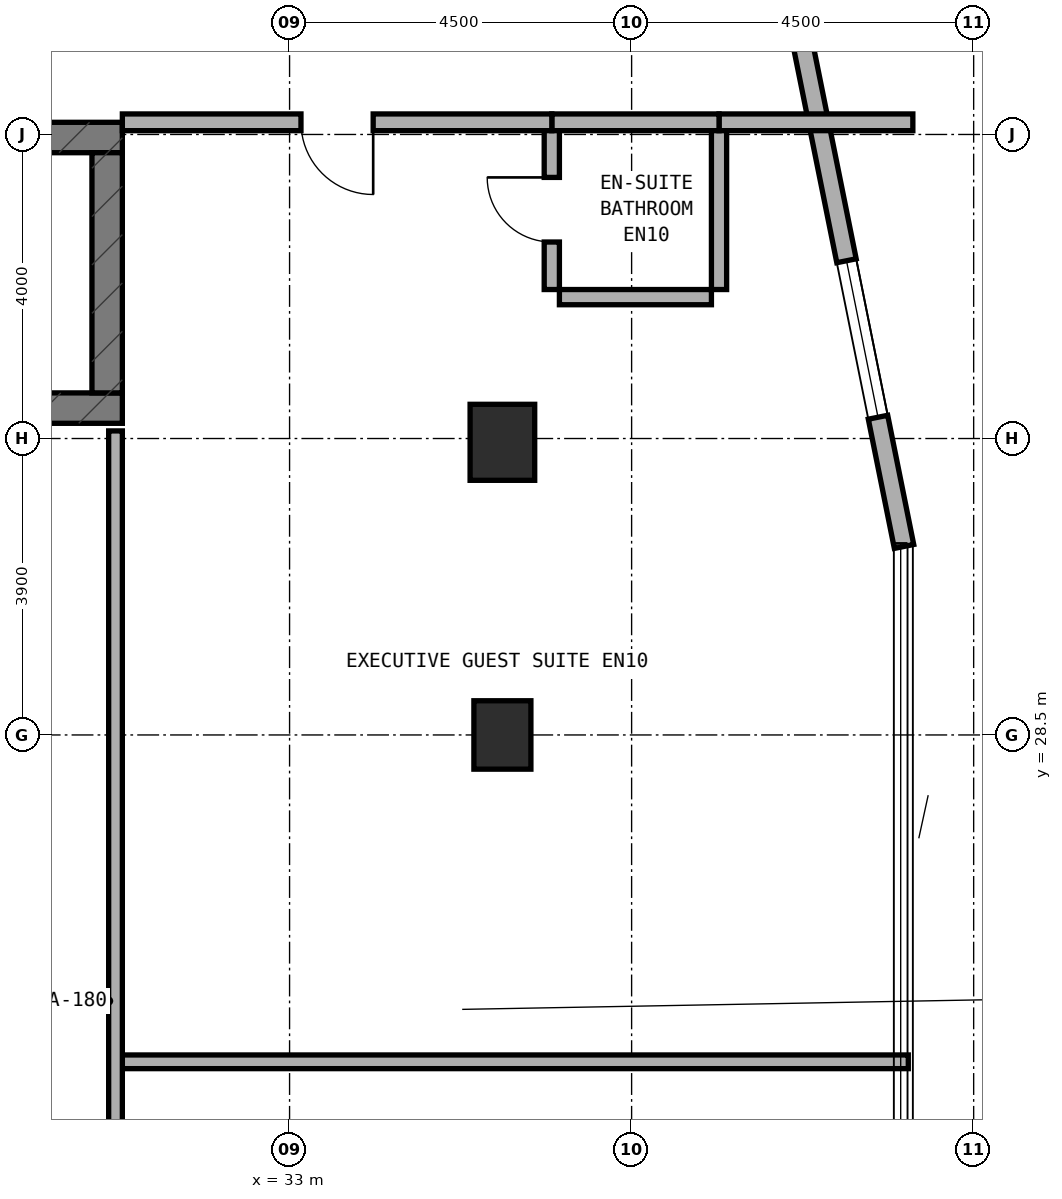
"""IFC4 building model, lengths in metres.
Left out: names, types, materials, properties, quantities, classifications, styles, units other than length and angle.
Written with IfcOpenShell. Run it as: python <this file> out.ifc"""

import sys

from ifc_helpers import new_model, si_unit, direction, frame, frame_2d, origin, origin_2d, place, context, subcontext, project, spatial, rectangle, extrude, element, fill, save


model = new_model("IFC4")
c1 = context("Model", 3, precision=1e-05, world=origin(), true_north=direction((0.0, 1.0)))
c2 = subcontext(c1, "Body", "Model", "MODEL_VIEW")
j1 = project(units=[si_unit("LENGTHUNIT", "METRE"), si_unit("PLANEANGLEUNIT", "RADIAN")], contexts=[c1])
p1 = place(None, origin())
s1 = spatial("IfcSite", under=j1, at=p1, CompositionType="ELEMENT")
p2 = place(p1, origin())
s2 = spatial("IfcBuilding", under=s1, at=p2, CompositionType="ELEMENT")
p3 = place(p2, frame((0.0, 0.0, 159.0)))
s3 = spatial("IfcBuildingStorey", under=s2, at=p3, CompositionType="ELEMENT", Elevation=159.0)
p4 = place(p3, frame((6.4, 32.8, 0.0), z_axis=(0.0, 0.0, 1.0), x_axis=(1.0, 0.0, 0.0)))
e1 = element("IfcWall", 1, at=p4, inside=s3, PredefinedType="SHEAR", context=c2, shape_type="SweptSolid", body=[
    extrude(rectangle(XDim=24.4, YDim=0.4, at=frame_2d((12.2, 0.0))), origin(), (0.0, 0.0, 1.0), 3.5),
])
p5 = place(p4, frame((6.05, 0.0, 0.0)))
e2 = element("IfcOpeningElement", 2, at=p5, cuts=e1, PredefinedType="OPENING", context=c2, shape_type="SweptSolid", body=[
    extrude(rectangle(XDim=1.1, YDim=2.15, at=frame_2d((0.55, 1.075))), frame((0.0, 0.21, 0.0), z_axis=(0.0, -1.0, 0.0), x_axis=(1.0, 0.0, 0.0)), (0.0, 0.0, 1.0), 0.42),
])
p6 = place(p3, frame((6.4, 36.36, 0.0), z_axis=(0.0, 0.0, 1.0), x_axis=(1.0, 0.0, 0.0)))
e3 = element("IfcWall", 3, at=p6, inside=s3, PredefinedType="SHEAR", context=c2, shape_type="SweptSolid", body=[
    extrude(rectangle(XDim=24.4, YDim=0.4, at=frame_2d((12.2, 0.0))), origin(), (0.0, 0.0, 1.0), 3.5),
])
p7 = place(p6, frame((9.15, 0.0, 0.0)))
e4 = element("IfcOpeningElement", 4, at=p7, cuts=e3, PredefinedType="OPENING", context=c2, shape_type="SweptSolid", body=[
    extrude(rectangle(XDim=1.2, YDim=2.15, at=frame_2d((0.6, 1.075))), frame((0.0, 0.21, 0.0), z_axis=(0.0, -1.0, 0.0), x_axis=(1.0, 0.0, 0.0)), (0.0, 0.0, 1.0), 0.42),
])
p8 = place(p6, frame((19.2, 0.0, 0.0)))
e5 = element("IfcOpeningElement", 5, at=p8, cuts=e3, PredefinedType="OPENING", context=c2, shape_type="SweptSolid", body=[
    extrude(rectangle(XDim=0.85, YDim=2.1, at=frame_2d((0.425, 1.05))), frame((0.0, 0.21, 0.0), z_axis=(0.0, -1.0, 0.0), x_axis=(1.0, 0.0, 0.0)), (0.0, 0.0, 1.0), 0.42),
])
p9 = place(p6, frame((16.94, 0.0, 0.0)))
e6 = element("IfcOpeningElement", 6, at=p9, cuts=e3, PredefinedType="OPENING", context=c2, shape_type="SweptSolid", body=[
    extrude(rectangle(XDim=0.85, YDim=2.1, at=frame_2d((0.425, 1.05))), frame((0.0, 0.21, 0.0), z_axis=(0.0, -1.0, 0.0), x_axis=(1.0, 0.0, 0.0)), (0.0, 0.0, 1.0), 0.42),
])
p10 = place(p3, frame((30.6, 33.0, 0.0), z_axis=(0.0, 0.0, 1.0), x_axis=(0.0, 1.0, 0.0)))
e7 = element("IfcWall", 7, at=p10, inside=s3, PredefinedType="SHEAR", context=c2, shape_type="SweptSolid", body=[
    extrude(rectangle(XDim=3.16, YDim=0.4, at=frame_2d((1.58, 0.0))), origin(), (0.0, 0.0, 1.0), 3.5),
])
p11 = place(p3, frame((35.8, 28.5, 0.0), z_axis=(0.0, 0.0, 1.0), x_axis=(1.0, 0.0, 0.0)))
e8 = element("IfcColumn", 8, at=p11, inside=s3, PredefinedType="COLUMN", context=c2, shape_type="SweptSolid", body=[
    extrude(rectangle(XDim=0.75, YDim=0.9, at=origin_2d()), origin(), (0.0, 0.0, 1.0), 3.5),
])
p12 = place(p3, frame((35.8, 32.35, 0.0), z_axis=(0.0, 0.0, 1.0), x_axis=(1.0, 0.0, 0.0)))
e9 = element("IfcColumn", 9, at=p12, inside=s3, PredefinedType="COLUMN", context=c2, shape_type="SweptSolid", body=[
    extrude(rectangle(XDim=0.85, YDim=1.0, at=origin_2d()), origin(), (0.0, 0.0, 1.0), 3.5),
])
p13 = place(p3, frame((41.084, 30.98, 0.0), z_axis=(0.0, 0.0, 1.0), x_axis=(-0.197435082048, 0.980315963543, 0.0)))
e10 = element("IfcWall", 10, at=p13, inside=s3, PredefinedType="STANDARD", context=c2, shape_type="SweptSolid", body=[
    extrude(rectangle(XDim=9.183, YDim=0.26, at=frame_2d((4.591, 0.0))), origin(), (0.0, 0.0, 1.0), 3.22),
])
p14 = place(p13, frame((1.734, 0.0, 0.85)))
e11 = element("IfcOpeningElement", 11, at=p14, cuts=e10, PredefinedType="OPENING", context=c2, shape_type="SweptSolid", body=[
    extrude(rectangle(XDim=2.1, YDim=1.5, at=frame_2d((1.05, 0.75))), frame((0.0, 0.14, 0.0), z_axis=(0.0, -1.0, 0.0), x_axis=(1.0, 0.0, 0.0)), (0.0, 0.0, 1.0), 0.28),
])
p15 = place(p3, frame((30.8, 24.2, 0.0), z_axis=(0.0, 0.0, 1.0), x_axis=(1.0, 0.0, 0.0)))
e12 = element("IfcWall", 12, at=p15, inside=s3, PredefinedType="SOLIDWALL", context=c2, shape_type="SweptSolid", body=[
    extrude(rectangle(XDim=10.34, YDim=0.18, at=frame_2d((5.17, 0.0))), origin(), (0.0, 0.0, 1.0), 2.835),
])
p16 = place(p3, frame((30.71, 17.5, 0.0), z_axis=(0.0, 0.0, 1.0), x_axis=(0.0, 1.0, 0.0)))
e13 = element("IfcWall", 13, at=p16, inside=s3, PredefinedType="SOLIDWALL", context=c2, shape_type="SweptSolid", body=[
    extrude(rectangle(XDim=15.0, YDim=0.18, at=frame_2d((7.5, 0.0))), origin(), (0.0, 0.0, 1.0), 2.795),
])
p17 = place(p3, frame((36.45, 34.36, 0.0), z_axis=(0.0, 0.0, 1.0), x_axis=(0.0, 1.0, 0.0)))
e14 = element("IfcWall", 14, at=p17, inside=s3, PredefinedType="PLUMBINGWALL", context=c2, shape_type="SweptSolid", body=[
    extrude(rectangle(XDim=2.1, YDim=0.2, at=frame_2d((1.05, 0.0))), origin(), (0.0, 0.0, 1.0), 3.22),
])
p18 = place(p17, frame((0.625, 0.0, 0.0)))
e15 = element("IfcOpeningElement", 15, at=p18, cuts=e14, PredefinedType="OPENING", context=c2, shape_type="SweptSolid", body=[
    extrude(rectangle(XDim=0.85, YDim=2.1, at=frame_2d((0.425, 1.05))), frame((0.0, 0.11, 0.0), z_axis=(0.0, -1.0, 0.0), x_axis=(1.0, 0.0, 0.0)), (0.0, 0.0, 1.0), 0.22),
])
p19 = place(p3, frame((36.55, 34.26, 0.0), z_axis=(0.0, 0.0, 1.0), x_axis=(1.0, 0.0, 0.0)))
e16 = element("IfcWall", 16, at=p19, inside=s3, PredefinedType="PLUMBINGWALL", context=c2, shape_type="SweptSolid", body=[
    extrude(rectangle(XDim=2.0, YDim=0.2, at=frame_2d((1.0, 0.0))), origin(), (0.0, 0.0, 1.0), 3.22),
])
p20 = place(p3, frame((38.65, 34.36, 0.0), z_axis=(0.0, 0.0, 1.0), x_axis=(0.0, 1.0, 0.0)))
e17 = element("IfcWall", 17, at=p20, inside=s3, PredefinedType="PLUMBINGWALL", context=c2, shape_type="SweptSolid", body=[
    extrude(rectangle(XDim=2.1, YDim=0.2, at=frame_2d((1.05, 0.0))), origin(), (0.0, 0.0, 1.0), 3.22),
])
p21 = place(p3, frame((38.65, 36.56, 0.0), z_axis=(0.0, 0.0, 1.0), x_axis=(1.0, 0.0, 0.0)))
e18 = element("IfcWall", 18, at=p21, inside=s3, PredefinedType="SOLIDWALL", context=c2, shape_type="SweptSolid", body=[
    extrude(rectangle(XDim=2.55, YDim=0.22, at=frame_2d((1.275, 0.0))), origin(), (0.0, 0.0, 1.0), 3.22),
])
p22 = place(p3, frame((36.45, 36.56, 0.0), z_axis=(0.0, 0.0, 1.0), x_axis=(1.0, 0.0, 0.0)))
e19 = element("IfcWall", 19, at=p22, inside=s3, PredefinedType="SOLIDWALL", context=c2, shape_type="SweptSolid", body=[
    extrude(rectangle(XDim=2.2, YDim=0.22, at=frame_2d((1.1, 0.0))), origin(), (0.0, 0.0, 1.0), 3.22),
])
p23 = place(p3, frame((30.8, 36.56, 0.0), z_axis=(0.0, 0.0, 1.0), x_axis=(1.0, 0.0, 0.0)))
e20 = element("IfcWall", 20, at=p23, inside=s3, PredefinedType="SOLIDWALL", context=c2, shape_type="SweptSolid", body=[
    extrude(rectangle(XDim=5.65, YDim=0.22, at=frame_2d((2.825, 0.0))), origin(), (0.0, 0.0, 1.0), 2.795),
])
p24 = place(p23, frame((2.35, 0.0, 0.0)))
e21 = element("IfcOpeningElement", 21, at=p24, cuts=e20, PredefinedType="OPENING", context=c2, shape_type="SweptSolid", body=[
    extrude(rectangle(XDim=0.95, YDim=2.1, at=frame_2d((0.475, 1.05))), frame((0.0, 0.12, 0.0), z_axis=(0.0, -1.0, 0.0), x_axis=(1.0, 0.0, 0.0)), (0.0, 0.0, 1.0), 0.24),
])
p25 = place(p14, origin())
e22 = element("IfcWindow", 22, at=p25, inside=s3, PartitioningType="SINGLE_PANEL", PredefinedType="WINDOW", context=c2, shape_type="SweptSolid", body=[
    extrude(rectangle(XDim=2.1, YDim=1.5, at=frame_2d((1.05, 0.75))), frame((0.0, 0.03, 0.0), z_axis=(0.0, -1.0, 0.0), x_axis=(1.0, 0.0, 0.0)), (0.0, 0.0, 1.0), 0.06),
])
fill(e11, e22)
p26 = place(p18, origin())
e23 = element("IfcDoor", 23, at=p26, inside=s3, OperationType="SINGLE_SWING_RIGHT", PredefinedType="DOOR", context=c2, shape_type="SweptSolid", body=[
    extrude(rectangle(XDim=0.85, YDim=2.1, at=frame_2d((0.425, 1.05))), frame((0.0, 0.025, 0.0), z_axis=(0.0, -1.0, 0.0), x_axis=(1.0, 0.0, 0.0)), (0.0, 0.0, 1.0), 0.05),
])
fill(e15, e23)
p27 = place(p24, frame((0.95, 0.0, 0.0), z_axis=(0.0, 0.0, 1.0), x_axis=(-1.0, 0.0, 0.0)))
e24 = element("IfcDoor", 24, at=p27, inside=s3, OperationType="SINGLE_SWING_LEFT", PredefinedType="DOOR", context=c2, shape_type="SweptSolid", body=[
    extrude(rectangle(XDim=0.95, YDim=2.1, at=frame_2d((0.475, 1.05))), frame((0.0, 0.025, 0.0), z_axis=(0.0, -1.0, 0.0), x_axis=(1.0, 0.0, 0.0)), (0.0, 0.0, 1.0), 0.05),
])
fill(e21, e24)
save(model, sys.argv[1])
